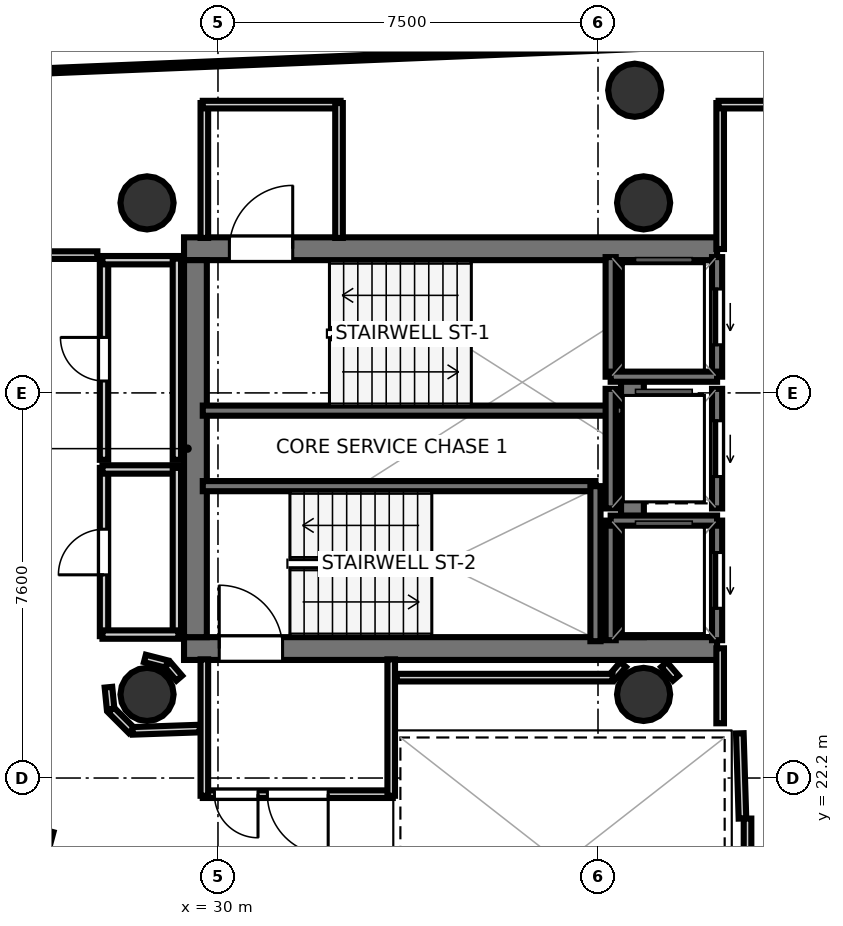
"""IFC4 building model, lengths in metres.
Left out: names, types, materials, properties, quantities, classifications, styles, units other than length and angle.
Written with IfcOpenShell. Run it as: python <this file> out.ifc"""

import sys

from ifc_helpers import new_model, si_unit, direction, frame, frame_2d, origin, origin_2d, place, context, subcontext, project, spatial, rectangle, hollow_circle, extrude, element, fill, save


model = new_model("IFC4")
c1 = context("Model", 3, precision=1e-05, world=origin(), true_north=direction((0.0, 1.0)))
c2 = subcontext(c1, "Body", "Model", "MODEL_VIEW")
j1 = project(units=[si_unit("LENGTHUNIT", "METRE"), si_unit("PLANEANGLEUNIT", "RADIAN")], contexts=[c1])
p1 = place(None, origin())
s1 = spatial("IfcSite", under=j1, at=p1, CompositionType="ELEMENT")
p2 = place(p1, origin())
s2 = spatial("IfcBuilding", under=s1, at=p2, CompositionType="ELEMENT")
p3 = place(p2, frame((0.0, 0.0, 261.2)))
s3 = spatial("IfcBuildingStorey", under=s2, at=p3, CompositionType="ELEMENT", Elevation=261.2)
p4 = place(p3, frame((29.33, 32.645, 0.0), z_axis=(0.0, 0.0, 1.0), x_axis=(1.0, 0.0, 0.0)))
e1 = element("IfcWall", 1, at=p4, inside=s3, PredefinedType="SHEAR", context=c2, shape_type="SweptSolid", body=[
    extrude(rectangle(XDim=10.52, YDim=0.45, at=frame_2d((5.26, 0.0))), origin(), (0.0, 0.0, 1.0), 3.52),
])
p5 = place(p4, frame((0.895, 0.0, 0.0)))
e2 = element("IfcOpeningElement", 2, at=p5, cuts=e1, PredefinedType="OPENING", context=c2, shape_type="SweptSolid", body=[
    extrude(rectangle(XDim=1.25, YDim=2.15, at=frame_2d((0.625, 1.075))), frame((0.0, 0.235, 0.0), z_axis=(0.0, -1.0, 0.0), x_axis=(1.0, 0.0, 0.0)), (0.0, 0.0, 1.0), 0.47),
])
p6 = place(p3, frame((29.33, 24.755, 0.0), z_axis=(0.0, 0.0, 1.0), x_axis=(1.0, 0.0, 0.0)))
e3 = element("IfcWall", 3, at=p6, inside=s3, PredefinedType="SHEAR", context=c2, shape_type="SweptSolid", body=[
    extrude(rectangle(XDim=10.52, YDim=0.45, at=frame_2d((5.26, 0.0))), origin(), (0.0, 0.0, 1.0), 3.52),
])
p7 = place(p6, frame((0.695, 0.0, 0.0)))
e4 = element("IfcOpeningElement", 4, at=p7, cuts=e3, PredefinedType="OPENING", context=c2, shape_type="SweptSolid", body=[
    extrude(rectangle(XDim=1.25, YDim=2.15, at=frame_2d((0.625, 1.075))), frame((0.0, 0.235, 0.0), z_axis=(0.0, -1.0, 0.0), x_axis=(1.0, 0.0, 0.0)), (0.0, 0.0, 1.0), 0.47),
])
for number, where, z_axis, x_axis in (
    (5, (29.555, 24.98, 0.0), (0.0, 0.0, 1.0), (0.0, 1.0, 0.0)),
    (6, (38.18, 24.98, 0.0), (0.0, 0.0, 1.0), (0.0, 1.0, 0.0)),
):
    element("IfcWall", number, at=place(p3, frame(where, z_axis=z_axis, x_axis=x_axis)), inside=s3, PredefinedType="SHEAR", context=c2, shape_type="SweptSolid", body=[
        extrude(rectangle(XDim=7.44, YDim=0.45, at=frame_2d((3.72, 0.0))), origin(), (0.0, 0.0, 1.0), 3.52),
    ])
for number, where, z_axis, x_axis in (
    (7, (28.6, 33.55, 0.0), (0.0, 0.0, 1.0), (1.0, 0.0, 0.0)),
    (8, (28.6, 23.85, 0.0), (0.0, 0.0, 1.0), (1.0, 0.0, 0.0)),
    (9, (38.4, 33.55, 0.0), (0.0, 0.0, 1.0), (1.0, 0.0, 0.0)),
    (10, (38.4, 23.85, 0.0), (0.0, 0.0, 1.0), (1.0, 0.0, 0.0)),
    (11, (38.225, 35.773, 0.0), (0.0, 0.0, 1.0), (1.0, 0.0, 0.0)),
):
    element("IfcColumn", number, at=place(p3, frame(where, z_axis=z_axis, x_axis=x_axis)), inside=s3, PredefinedType="COLUMN", context=c2, shape_type="SweptSolid", body=[
        extrude(hollow_circle(Radius=0.525, WallThickness=0.028, at=origin_2d()), origin(), (0.0, 0.0, 1.0), 3.7),
    ])
p8 = place(p3, frame((29.7, 29.45, 0.0), z_axis=(0.0, 0.0, 1.0), x_axis=(1.0, 0.0, 0.0)))
e12 = element("IfcWall", 12, at=p8, inside=s3, PredefinedType="SOLIDWALL", context=c2, shape_type="SweptSolid", body=[
    extrude(rectangle(XDim=8.3, YDim=0.2, at=frame_2d((4.15, 0.0))), origin(), (0.0, 0.0, 1.0), 3.52),
])
p9 = place(p3, frame((29.7, 27.96, 0.0), z_axis=(0.0, 0.0, 1.0), x_axis=(1.0, 0.0, 0.0)))
e13 = element("IfcWall", 13, at=p9, inside=s3, PredefinedType="SOLIDWALL", context=c2, shape_type="SweptSolid", body=[
    extrude(rectangle(XDim=7.75, YDim=0.2, at=frame_2d((3.875, 0.0))), origin(), (0.0, 0.0, 1.0), 3.52),
])
p10 = place(p3, frame((37.45, 24.9, 0.0), z_axis=(0.0, 0.0, 1.0), x_axis=(0.0, 1.0, 0.0)))
e14 = element("IfcWall", 14, at=p10, inside=s3, PredefinedType="SOLIDWALL", context=c2, shape_type="SweptSolid", body=[
    extrude(rectangle(XDim=3.06, YDim=0.2, at=frame_2d((1.53, 0.0))), origin(), (0.0, 0.0, 1.0), 3.52),
])
p11 = place(p3, frame((39.85, 30.12, 0.0), z_axis=(0.0, 0.0, 1.0), x_axis=(0.0, 1.0, 0.0)))
e15 = element("IfcWall", 15, at=p11, inside=s3, PredefinedType="SOLIDWALL", context=c2, shape_type="SweptSolid", body=[
    extrude(rectangle(XDim=2.36, YDim=0.2, at=frame_2d((1.18, 0.0))), origin(), (0.0, 0.0, 1.0), 3.52),
])
p12 = place(p11, frame((0.63, 0.0, 0.0)))
e16 = element("IfcOpeningElement", 16, at=p12, cuts=e15, PredefinedType="OPENING", context=c2, shape_type="SweptSolid", body=[
    extrude(rectangle(XDim=1.1, YDim=2.15, at=frame_2d((0.55, 1.075))), frame((0.0, 0.11, 0.0), z_axis=(0.0, -1.0, 0.0), x_axis=(1.0, 0.0, 0.0)), (0.0, 0.0, 1.0), 0.22),
])
p13 = place(p3, frame((37.75, 30.12, 0.0), z_axis=(0.0, 0.0, 1.0), x_axis=(0.0, 1.0, 0.0)))
e17 = element("IfcWall", 17, at=p13, inside=s3, PredefinedType="SOLIDWALL", context=c2, shape_type="SweptSolid", body=[
    extrude(rectangle(XDim=2.36, YDim=0.2, at=frame_2d((1.18, 0.0))), origin(), (0.0, 0.0, 1.0), 3.52),
])
p14 = place(p3, frame((37.75, 30.12, 0.0), z_axis=(0.0, 0.0, 1.0), x_axis=(1.0, 0.0, 0.0)))
e18 = element("IfcWall", 18, at=p14, inside=s3, PredefinedType="SOLIDWALL", context=c2, shape_type="SweptSolid", body=[
    extrude(rectangle(XDim=2.1, YDim=0.2, at=frame_2d((1.05, 0.0))), origin(), (0.0, 0.0, 1.0), 3.52),
])
p15 = place(p3, frame((39.85, 24.92, 0.0), z_axis=(0.0, 0.0, 1.0), x_axis=(0.0, 1.0, 0.0)))
e19 = element("IfcWall", 19, at=p15, inside=s3, PredefinedType="SOLIDWALL", context=c2, shape_type="SweptSolid", body=[
    extrude(rectangle(XDim=2.36, YDim=0.2, at=frame_2d((1.18, 0.0))), origin(), (0.0, 0.0, 1.0), 3.52),
])
p16 = place(p15, frame((0.63, 0.0, 0.0)))
e20 = element("IfcOpeningElement", 20, at=p16, cuts=e19, PredefinedType="OPENING", context=c2, shape_type="SweptSolid", body=[
    extrude(rectangle(XDim=1.1, YDim=2.15, at=frame_2d((0.55, 1.075))), frame((0.0, 0.11, 0.0), z_axis=(0.0, -1.0, 0.0), x_axis=(1.0, 0.0, 0.0)), (0.0, 0.0, 1.0), 0.22),
])
p17 = place(p3, frame((37.75, 24.92, 0.0), z_axis=(0.0, 0.0, 1.0), x_axis=(0.0, 1.0, 0.0)))
e21 = element("IfcWall", 21, at=p17, inside=s3, PredefinedType="SOLIDWALL", context=c2, shape_type="SweptSolid", body=[
    extrude(rectangle(XDim=2.36, YDim=0.2, at=frame_2d((1.18, 0.0))), origin(), (0.0, 0.0, 1.0), 3.52),
])
p18 = place(p3, frame((37.75, 27.28, 0.0), z_axis=(0.0, 0.0, 1.0), x_axis=(1.0, 0.0, 0.0)))
e22 = element("IfcWall", 22, at=p18, inside=s3, PredefinedType="SOLIDWALL", context=c2, shape_type="SweptSolid", body=[
    extrude(rectangle(XDim=2.1, YDim=0.2, at=frame_2d((1.05, 0.0))), origin(), (0.0, 0.0, 1.0), 3.52),
])
p19 = place(p3, frame((39.85, 27.52, 0.0), z_axis=(0.0, 0.0, 1.0), x_axis=(0.0, 1.0, 0.0)))
e23 = element("IfcWall", 23, at=p19, inside=s3, PredefinedType="SOLIDWALL", context=c2, shape_type="SweptSolid", body=[
    extrude(rectangle(XDim=2.36, YDim=0.2, at=frame_2d((1.18, 0.0))), origin(), (0.0, 0.0, 1.0), 3.52),
])
p20 = place(p19, frame((0.63, 0.0, 0.0)))
e24 = element("IfcOpeningElement", 24, at=p20, cuts=e23, PredefinedType="OPENING", context=c2, shape_type="SweptSolid", body=[
    extrude(rectangle(XDim=1.1, YDim=2.15, at=frame_2d((0.55, 1.075))), frame((0.0, 0.11, 0.0), z_axis=(0.0, -1.0, 0.0), x_axis=(1.0, 0.0, 0.0)), (0.0, 0.0, 1.0), 0.22),
])
p21 = place(p3, frame((37.75, 27.52, 0.0), z_axis=(0.0, 0.0, 1.0), x_axis=(0.0, 1.0, 0.0)))
e25 = element("IfcWall", 25, at=p21, inside=s3, PredefinedType="SOLIDWALL", context=c2, shape_type="SweptSolid", body=[
    extrude(rectangle(XDim=2.36, YDim=0.2, at=frame_2d((1.18, 0.0))), origin(), (0.0, 0.0, 1.0), 3.52),
])
p22 = place(p3, frame((29.731, 32.858, 0.0), z_axis=(0.0, 0.0, 1.0), x_axis=(0.0, 1.0, 0.0)))
e26 = element("IfcWall", 26, at=p22, inside=s3, PredefinedType="PARTITIONING", context=c2, shape_type="SweptSolid", body=[
    extrude(rectangle(XDim=2.662, YDim=0.15, at=frame_2d((1.331, 0.0))), origin(), (0.0, 0.0, 1.0), 2.84),
])
p23 = place(p3, frame((29.7, 35.489, 0.0), z_axis=(0.0, 0.0, 1.0), x_axis=(1.0, 0.0, 0.0)))
e27 = element("IfcWall", 27, at=p23, inside=s3, PredefinedType="PARTITIONING", context=c2, shape_type="SweptSolid", body=[
    extrude(rectangle(XDim=2.72, YDim=0.15, at=frame_2d((1.36, 0.0))), origin(), (0.0, 0.0, 1.0), 2.84),
])
p24 = place(p3, frame((32.389, 35.52, 0.0), z_axis=(0.0, 0.0, 1.0), x_axis=(0.0, -1.0, 0.0)))
e28 = element("IfcWall", 28, at=p24, inside=s3, PredefinedType="PARTITIONING", context=c2, shape_type="SweptSolid", body=[
    extrude(rectangle(XDim=2.662, YDim=0.15, at=frame_2d((1.331, 0.0))), origin(), (0.0, 0.0, 1.0), 2.84),
])
p25 = place(p3, frame((33.45, 21.881, 0.0), z_axis=(0.0, 0.0, 1.0), x_axis=(-1.0, 0.0, 0.0)))
e29 = element("IfcWall", 29, at=p25, inside=s3, PredefinedType="PARTITIONING", context=c2, shape_type="SweptSolid", body=[
    extrude(rectangle(XDim=3.75, YDim=0.15, at=frame_2d((1.875, 0.0))), origin(), (0.0, 0.0, 1.0), 2.84),
])
p26 = place(p25, frame((1.275, 0.0, 0.0)))
e30 = element("IfcOpeningElement", 30, at=p26, cuts=e29, PredefinedType="OPENING", context=c2, shape_type="SweptSolid", body=[
    extrude(rectangle(XDim=1.2, YDim=2.15, at=frame_2d((0.6, 1.075))), frame((0.0, 0.085, 0.0), z_axis=(0.0, -1.0, 0.0), x_axis=(1.0, 0.0, 0.0)), (0.0, 0.0, 1.0), 0.17),
])
p27 = place(p25, frame((2.66, 0.0, 0.0)))
e31 = element("IfcOpeningElement", 31, at=p27, cuts=e29, PredefinedType="OPENING", context=c2, shape_type="SweptSolid", body=[
    extrude(rectangle(XDim=0.86, YDim=2.05, at=frame_2d((0.43, 1.025))), frame((0.0, 0.085, 0.0), z_axis=(0.0, -1.0, 0.0), x_axis=(1.0, 0.0, 0.0)), (0.0, 0.0, 1.0), 0.17),
])
for number, where, z_axis, x_axis in (
    (32, (29.731, 21.85, 0.0), (0.0, 0.0, 1.0), (0.0, 1.0, 0.0)),
    (33, (33.419, 24.542, 0.0), (0.0, 0.0, 1.0), (0.0, -1.0, 0.0)),
):
    element("IfcWall", number, at=place(p3, frame(where, z_axis=z_axis, x_axis=x_axis)), inside=s3, PredefinedType="PARTITIONING", context=c2, shape_type="SweptSolid", body=[
        extrude(rectangle(XDim=2.692, YDim=0.15, at=frame_2d((1.346, 0.0))), origin(), (0.0, 0.0, 1.0), 2.84),
    ])
p28 = place(p3, frame((40.351, 21.401, 0.0), z_axis=(0.0, 0.0, 1.0), x_axis=(-0.031058045979, 0.999517582527, 0.0)))
e34 = element("IfcWall", 34, at=p28, inside=s3, PredefinedType="PARTITIONING", context=c2, shape_type="SweptSolid", body=[
    extrude(rectangle(XDim=1.682, YDim=0.15, at=frame_2d((0.841, 0.0))), origin(), (0.0, 0.0, 1.0), 2.84),
])
p29 = place(p3, frame((39.911, 23.28, 0.0), z_axis=(0.0, 0.0, 1.0), x_axis=(0.0, 1.0, 0.0)))
e35 = element("IfcWall", 35, at=p29, inside=s3, PredefinedType="PARTITIONING", context=c2, shape_type="SweptSolid", body=[
    extrude(rectangle(XDim=1.48, YDim=0.15, at=frame_2d((0.74, 0.0))), origin(), (0.0, 0.0, 1.0), 2.84),
])
p30 = place(p3, frame((39.911, 32.64, 0.0), z_axis=(0.0, 0.0, 1.0), x_axis=(0.0, 1.0, 0.0)))
e36 = element("IfcWall", 36, at=p30, inside=s3, PredefinedType="PARTITIONING", context=c2, shape_type="SweptSolid", body=[
    extrude(rectangle(XDim=2.88, YDim=0.15, at=frame_2d((1.44, 0.0))), origin(), (0.0, 0.0, 1.0), 2.84),
])
p31 = place(p3, frame((39.88, 35.489, 0.0), z_axis=(0.0, 0.0, 1.0), x_axis=(1.0, 0.0, 0.0)))
e37 = element("IfcWall", 37, at=p31, inside=s3, PredefinedType="PARTITIONING", context=c2, shape_type="SweptSolid", body=[
    extrude(rectangle(XDim=1.48, YDim=0.15, at=frame_2d((0.74, 0.0))), origin(), (0.0, 0.0, 1.0), 2.84),
])
p32 = place(p3, frame((40.451, 18.08, 0.0), z_axis=(0.0, 0.0, 1.0), x_axis=(0.0, 1.0, 0.0)))
e38 = element("IfcWall", 38, at=p32, inside=s3, PredefinedType="PARTITIONING", context=c2, shape_type="SweptSolid", body=[
    extrude(rectangle(XDim=3.32, YDim=0.15, at=frame_2d((1.66, 0.0))), origin(), (0.0, 0.0, 1.0), 2.84),
])
p33 = place(p3, frame((27.751, 25.0, 0.0), z_axis=(0.0, 0.0, 1.0), x_axis=(0.0, 1.0, 0.0)))
e39 = element("IfcWall", 39, at=p33, inside=s3, PredefinedType="PLUMBINGWALL", context=c2, shape_type="SweptSolid", body=[
    extrude(rectangle(XDim=3.32, YDim=0.165, at=frame_2d((1.66, 0.0))), origin(), (0.0, 0.0, 1.0), 2.84),
])
p34 = place(p33, frame((1.21, 0.0, 0.0)))
e40 = element("IfcOpeningElement", 40, at=p34, cuts=e39, PredefinedType="OPENING", context=c2, shape_type="SweptSolid", body=[
    extrude(rectangle(XDim=0.9, YDim=2.1, at=frame_2d((0.45, 1.05))), frame((0.0, 0.093, 0.0), z_axis=(0.0, -1.0, 0.0), x_axis=(1.0, 0.0, 0.0)), (0.0, 0.0, 1.0), 0.185),
])
p35 = place(p3, frame((27.72, 28.289, 0.0), z_axis=(0.0, 0.0, 1.0), x_axis=(1.0, 0.0, 0.0)))
e41 = element("IfcWall", 41, at=p35, inside=s3, PredefinedType="PLUMBINGWALL", context=c2, shape_type="SweptSolid", body=[
    extrude(rectangle(XDim=1.5, YDim=0.165, at=frame_2d((0.75, 0.0))), origin(), (0.0, 0.0, 1.0), 2.84),
])
p36 = place(p3, frame((29.189, 28.32, 0.0), z_axis=(0.0, 0.0, 1.0), x_axis=(0.0, -1.0, 0.0)))
e42 = element("IfcWall", 42, at=p36, inside=s3, PredefinedType="PLUMBINGWALL", context=c2, shape_type="SweptSolid", body=[
    extrude(rectangle(XDim=3.32, YDim=0.165, at=frame_2d((1.66, 0.0))), origin(), (0.0, 0.0, 1.0), 2.84),
])
p37 = place(p3, frame((29.22, 25.031, 0.0), z_axis=(0.0, 0.0, 1.0), x_axis=(-1.0, 0.0, 0.0)))
e43 = element("IfcWall", 43, at=p37, inside=s3, PredefinedType="PLUMBINGWALL", context=c2, shape_type="SweptSolid", body=[
    extrude(rectangle(XDim=1.5, YDim=0.165, at=frame_2d((0.75, 0.0))), origin(), (0.0, 0.0, 1.0), 2.84),
])
p38 = place(p3, frame((27.751, 28.48, 0.0), z_axis=(0.0, 0.0, 1.0), x_axis=(0.0, 1.0, 0.0)))
e44 = element("IfcWall", 44, at=p38, inside=s3, PredefinedType="PLUMBINGWALL", context=c2, shape_type="SweptSolid", body=[
    extrude(rectangle(XDim=3.97, YDim=0.165, at=frame_2d((1.985, 0.0))), origin(), (0.0, 0.0, 1.0), 2.84),
])
p39 = place(p38, frame((1.555, 0.0, 0.0)))
e45 = element("IfcOpeningElement", 45, at=p39, cuts=e44, PredefinedType="OPENING", context=c2, shape_type="SweptSolid", body=[
    extrude(rectangle(XDim=0.86, YDim=2.05, at=frame_2d((0.43, 1.025))), frame((0.0, 0.093, 0.0), z_axis=(0.0, -1.0, 0.0), x_axis=(1.0, 0.0, 0.0)), (0.0, 0.0, 1.0), 0.185),
])
p40 = place(p3, frame((27.72, 32.419, 0.0), z_axis=(0.0, 0.0, 1.0), x_axis=(1.0, 0.0, 0.0)))
e46 = element("IfcWall", 46, at=p40, inside=s3, PredefinedType="PLUMBINGWALL", context=c2, shape_type="SweptSolid", body=[
    extrude(rectangle(XDim=1.5, YDim=0.165, at=frame_2d((0.75, 0.0))), origin(), (0.0, 0.0, 1.0), 2.84),
])
p41 = place(p3, frame((29.189, 32.45, 0.0), z_axis=(0.0, 0.0, 1.0), x_axis=(0.0, -1.0, 0.0)))
e47 = element("IfcWall", 47, at=p41, inside=s3, PredefinedType="PLUMBINGWALL", context=c2, shape_type="SweptSolid", body=[
    extrude(rectangle(XDim=3.97, YDim=0.165, at=frame_2d((1.985, 0.0))), origin(), (0.0, 0.0, 1.0), 2.84),
])
p42 = place(p3, frame((29.236, 24.17, 0.0), z_axis=(0.0, 0.0, 1.0), x_axis=(-0.652260263346, 0.757995084984, 0.0)))
e48 = element("IfcWall", 48, at=p42, inside=s3, PredefinedType="PARTITIONING", context=c2, shape_type="SweptSolid", body=[
    extrude(rectangle(XDim=0.355, YDim=0.15, at=frame_2d((0.178, 0.0))), origin(), (0.0, 0.0, 1.0), 2.84),
])
p43 = place(p3, frame((28.988, 24.45, 0.0), z_axis=(0.0, 0.0, 1.0), x_axis=(-0.968704505916, 0.248216800836, 0.0)))
e49 = element("IfcWall", 49, at=p43, inside=s3, PredefinedType="PARTITIONING", context=c2, shape_type="SweptSolid", body=[
    extrude(rectangle(XDim=0.445, YDim=0.15, at=frame_2d((0.222, 0.0))), origin(), (0.0, 0.0, 1.0), 2.84),
])
p44 = place(p3, frame((39.036, 24.17, 0.0), z_axis=(0.0, 0.0, 1.0), x_axis=(-0.652260263346, 0.757995084984, 0.0)))
e50 = element("IfcWall", 50, at=p44, inside=s3, PredefinedType="PARTITIONING", context=c2, shape_type="SweptSolid", body=[
    extrude(rectangle(XDim=0.355, YDim=0.15, at=frame_2d((0.178, 0.0))), origin(), (0.0, 0.0, 1.0), 2.84),
])
p45 = place(p3, frame((37.996, 24.44, 0.0), z_axis=(0.0, 0.0, 1.0), x_axis=(-0.652425645794, -0.757852740782, 0.0)))
e51 = element("IfcWall", 51, at=p45, inside=s3, PredefinedType="PARTITIONING", context=c2, shape_type="SweptSolid", body=[
    extrude(rectangle(XDim=0.32, YDim=0.15, at=frame_2d((0.16, 0.0))), origin(), (0.0, 0.0, 1.0), 2.84),
])
p46 = place(p3, frame((37.787, 24.181, 0.0), z_axis=(0.0, 0.0, 1.0), x_axis=(-1.0, 0.0, 0.0)))
e52 = element("IfcWall", 52, at=p46, inside=s3, PredefinedType="PARTITIONING", context=c2, shape_type="SweptSolid", body=[
    extrude(rectangle(XDim=4.257, YDim=0.15, at=frame_2d((2.129, 0.0))), origin(), (0.0, 0.0, 1.0), 2.84),
])
p47 = place(p3, frame((27.838, 23.992, 0.0), z_axis=(0.0, 0.0, 1.0), x_axis=(0.098273407977, -0.995159453196, 0.0)))
e53 = element("IfcWall", 53, at=p47, inside=s3, PredefinedType="PARTITIONING", context=c2, shape_type="SweptSolid", body=[
    extrude(rectangle(XDim=0.432, YDim=0.15, at=frame_2d((0.216, 0.0))), origin(), (0.0, 0.0, 1.0), 2.84),
])
p48 = place(p3, frame((27.89, 23.543, 0.0), z_axis=(0.0, 0.0, 1.0), x_axis=(0.707106781187, -0.707106781187, 0.0)))
e54 = element("IfcWall", 54, at=p48, inside=s3, PredefinedType="PARTITIONING", context=c2, shape_type="SweptSolid", body=[
    extrude(rectangle(XDim=0.57, YDim=0.15, at=frame_2d((0.285, 0.0))), origin(), (0.0, 0.0, 1.0), 2.84),
])
p49 = place(p3, frame((28.316, 23.131, 0.0), z_axis=(0.0, 0.0, 1.0), x_axis=(0.999405342193, 0.034481328227, 0.0)))
e55 = element("IfcWall", 55, at=p49, inside=s3, PredefinedType="PARTITIONING", context=c2, shape_type="SweptSolid", body=[
    extrude(rectangle(XDim=1.324, YDim=0.15, at=frame_2d((0.662, 0.0))), origin(), (0.0, 0.0, 1.0), 2.84),
])
p50 = place(p3, frame((25.693, 17.453, 0.0), z_axis=(0.0, 0.0, 1.0), x_axis=(0.258115276845, 0.966114125691, 0.0)))
e56 = element("IfcWall", 56, at=p50, inside=s3, PredefinedType="PARTITIONING", context=c2, shape_type="SweptSolid", body=[
    extrude(rectangle(XDim=3.827, YDim=0.15, at=frame_2d((1.914, 0.0))), origin(), (0.0, 0.0, 1.0), 2.84),
])
p51 = place(p3, frame((25.25, 32.519, 0.0), z_axis=(0.0, 0.0, 1.0), x_axis=(1.0, 0.0, 0.0)))
e57 = element("IfcWall", 57, at=p51, inside=s3, PredefinedType="PARTITIONING", context=c2, shape_type="SweptSolid", body=[
    extrude(rectangle(XDim=2.37, YDim=0.15, at=frame_2d((1.185, 0.0))), origin(), (0.0, 0.0, 1.0), 2.84),
])
p52 = place(p3, frame((21.45, 35.942, 0.0), z_axis=(0.0, 0.0, 1.0), x_axis=(0.999146821051, 0.041299273399, 0.0)))
e58 = element("IfcWall", 58, at=p52, inside=s3, PredefinedType="PARTITIONING", context=c2, shape_type="SweptSolid", body=[
    extrude(rectangle(XDim=34.854, YDim=0.105, at=frame_2d((17.427, 0.0))), origin(), (0.0, 0.0, 1.0), 2.84),
])
p53 = place(p5, origin())
e59 = element("IfcDoor", 59, at=p53, inside=s3, OperationType="SINGLE_SWING_RIGHT", PredefinedType="DOOR", context=c2, shape_type="SweptSolid", body=[
    extrude(rectangle(XDim=1.25, YDim=2.15, at=frame_2d((0.625, 1.075))), frame((0.0, 0.025, 0.0), z_axis=(0.0, -1.0, 0.0), x_axis=(1.0, 0.0, 0.0)), (0.0, 0.0, 1.0), 0.05),
])
fill(e2, e59)
p54 = place(p7, origin())
e60 = element("IfcDoor", 60, at=p54, inside=s3, OperationType="SINGLE_SWING_LEFT", PredefinedType="DOOR", context=c2, shape_type="SweptSolid", body=[
    extrude(rectangle(XDim=1.25, YDim=2.15, at=frame_2d((0.625, 1.075))), frame((0.0, 0.025, 0.0), z_axis=(0.0, -1.0, 0.0), x_axis=(1.0, 0.0, 0.0)), (0.0, 0.0, 1.0), 0.05),
])
fill(e4, e60)
p55 = place(p12, origin())
e61 = element("IfcDoor", 61, at=p55, inside=s3, OperationType="SLIDING_TO_LEFT", PredefinedType="DOOR", context=c2, shape_type="SweptSolid", body=[
    extrude(rectangle(XDim=1.1, YDim=2.15, at=frame_2d((0.55, 1.075))), frame((0.0, 0.025, 0.0), z_axis=(0.0, -1.0, 0.0), x_axis=(1.0, 0.0, 0.0)), (0.0, 0.0, 1.0), 0.05),
])
fill(e16, e61)
p56 = place(p16, origin())
e62 = element("IfcDoor", 62, at=p56, inside=s3, OperationType="SLIDING_TO_LEFT", PredefinedType="DOOR", context=c2, shape_type="SweptSolid", body=[
    extrude(rectangle(XDim=1.1, YDim=2.15, at=frame_2d((0.55, 1.075))), frame((0.0, 0.025, 0.0), z_axis=(0.0, -1.0, 0.0), x_axis=(1.0, 0.0, 0.0)), (0.0, 0.0, 1.0), 0.05),
])
fill(e20, e62)
p57 = place(p20, origin())
e63 = element("IfcDoor", 63, at=p57, inside=s3, OperationType="SLIDING_TO_LEFT", PredefinedType="DOOR", context=c2, shape_type="SweptSolid", body=[
    extrude(rectangle(XDim=1.1, YDim=2.15, at=frame_2d((0.55, 1.075))), frame((0.0, 0.025, 0.0), z_axis=(0.0, -1.0, 0.0), x_axis=(1.0, 0.0, 0.0)), (0.0, 0.0, 1.0), 0.05),
])
fill(e24, e63)
p58 = place(p26, origin())
e64 = element("IfcDoor", 64, at=p58, inside=s3, OperationType="SINGLE_SWING_LEFT", PredefinedType="DOOR", context=c2, shape_type="SweptSolid", body=[
    extrude(rectangle(XDim=1.2, YDim=2.15, at=frame_2d((0.6, 1.075))), frame((0.0, 0.025, 0.0), z_axis=(0.0, -1.0, 0.0), x_axis=(1.0, 0.0, 0.0)), (0.0, 0.0, 1.0), 0.05),
])
fill(e30, e64)
p59 = place(p34, origin())
e65 = element("IfcDoor", 65, at=p59, inside=s3, OperationType="SINGLE_SWING_LEFT", PredefinedType="DOOR", context=c2, shape_type="SweptSolid", body=[
    extrude(rectangle(XDim=0.9, YDim=2.1, at=frame_2d((0.45, 1.05))), frame((0.0, 0.025, 0.0), z_axis=(0.0, -1.0, 0.0), x_axis=(1.0, 0.0, 0.0)), (0.0, 0.0, 1.0), 0.05),
])
fill(e40, e65)
p60 = place(p39, origin())
e66 = element("IfcDoor", 66, at=p60, inside=s3, OperationType="SINGLE_SWING_RIGHT", PredefinedType="DOOR", context=c2, shape_type="SweptSolid", body=[
    extrude(rectangle(XDim=0.86, YDim=2.05, at=frame_2d((0.43, 1.025))), frame((0.0, 0.025, 0.0), z_axis=(0.0, -1.0, 0.0), x_axis=(1.0, 0.0, 0.0)), (0.0, 0.0, 1.0), 0.05),
])
fill(e45, e66)
p61 = place(p27, origin())
e67 = element("IfcDoor", 67, at=p61, inside=s3, OperationType="SINGLE_SWING_LEFT", PredefinedType="DOOR", context=c2, shape_type="SweptSolid", body=[
    extrude(rectangle(XDim=0.86, YDim=2.05, at=frame_2d((0.43, 1.025))), frame((0.0, 0.025, 0.0), z_axis=(0.0, -1.0, 0.0), x_axis=(1.0, 0.0, 0.0)), (0.0, 0.0, 1.0), 0.05),
])
fill(e31, e67)
save(model, sys.argv[1])
